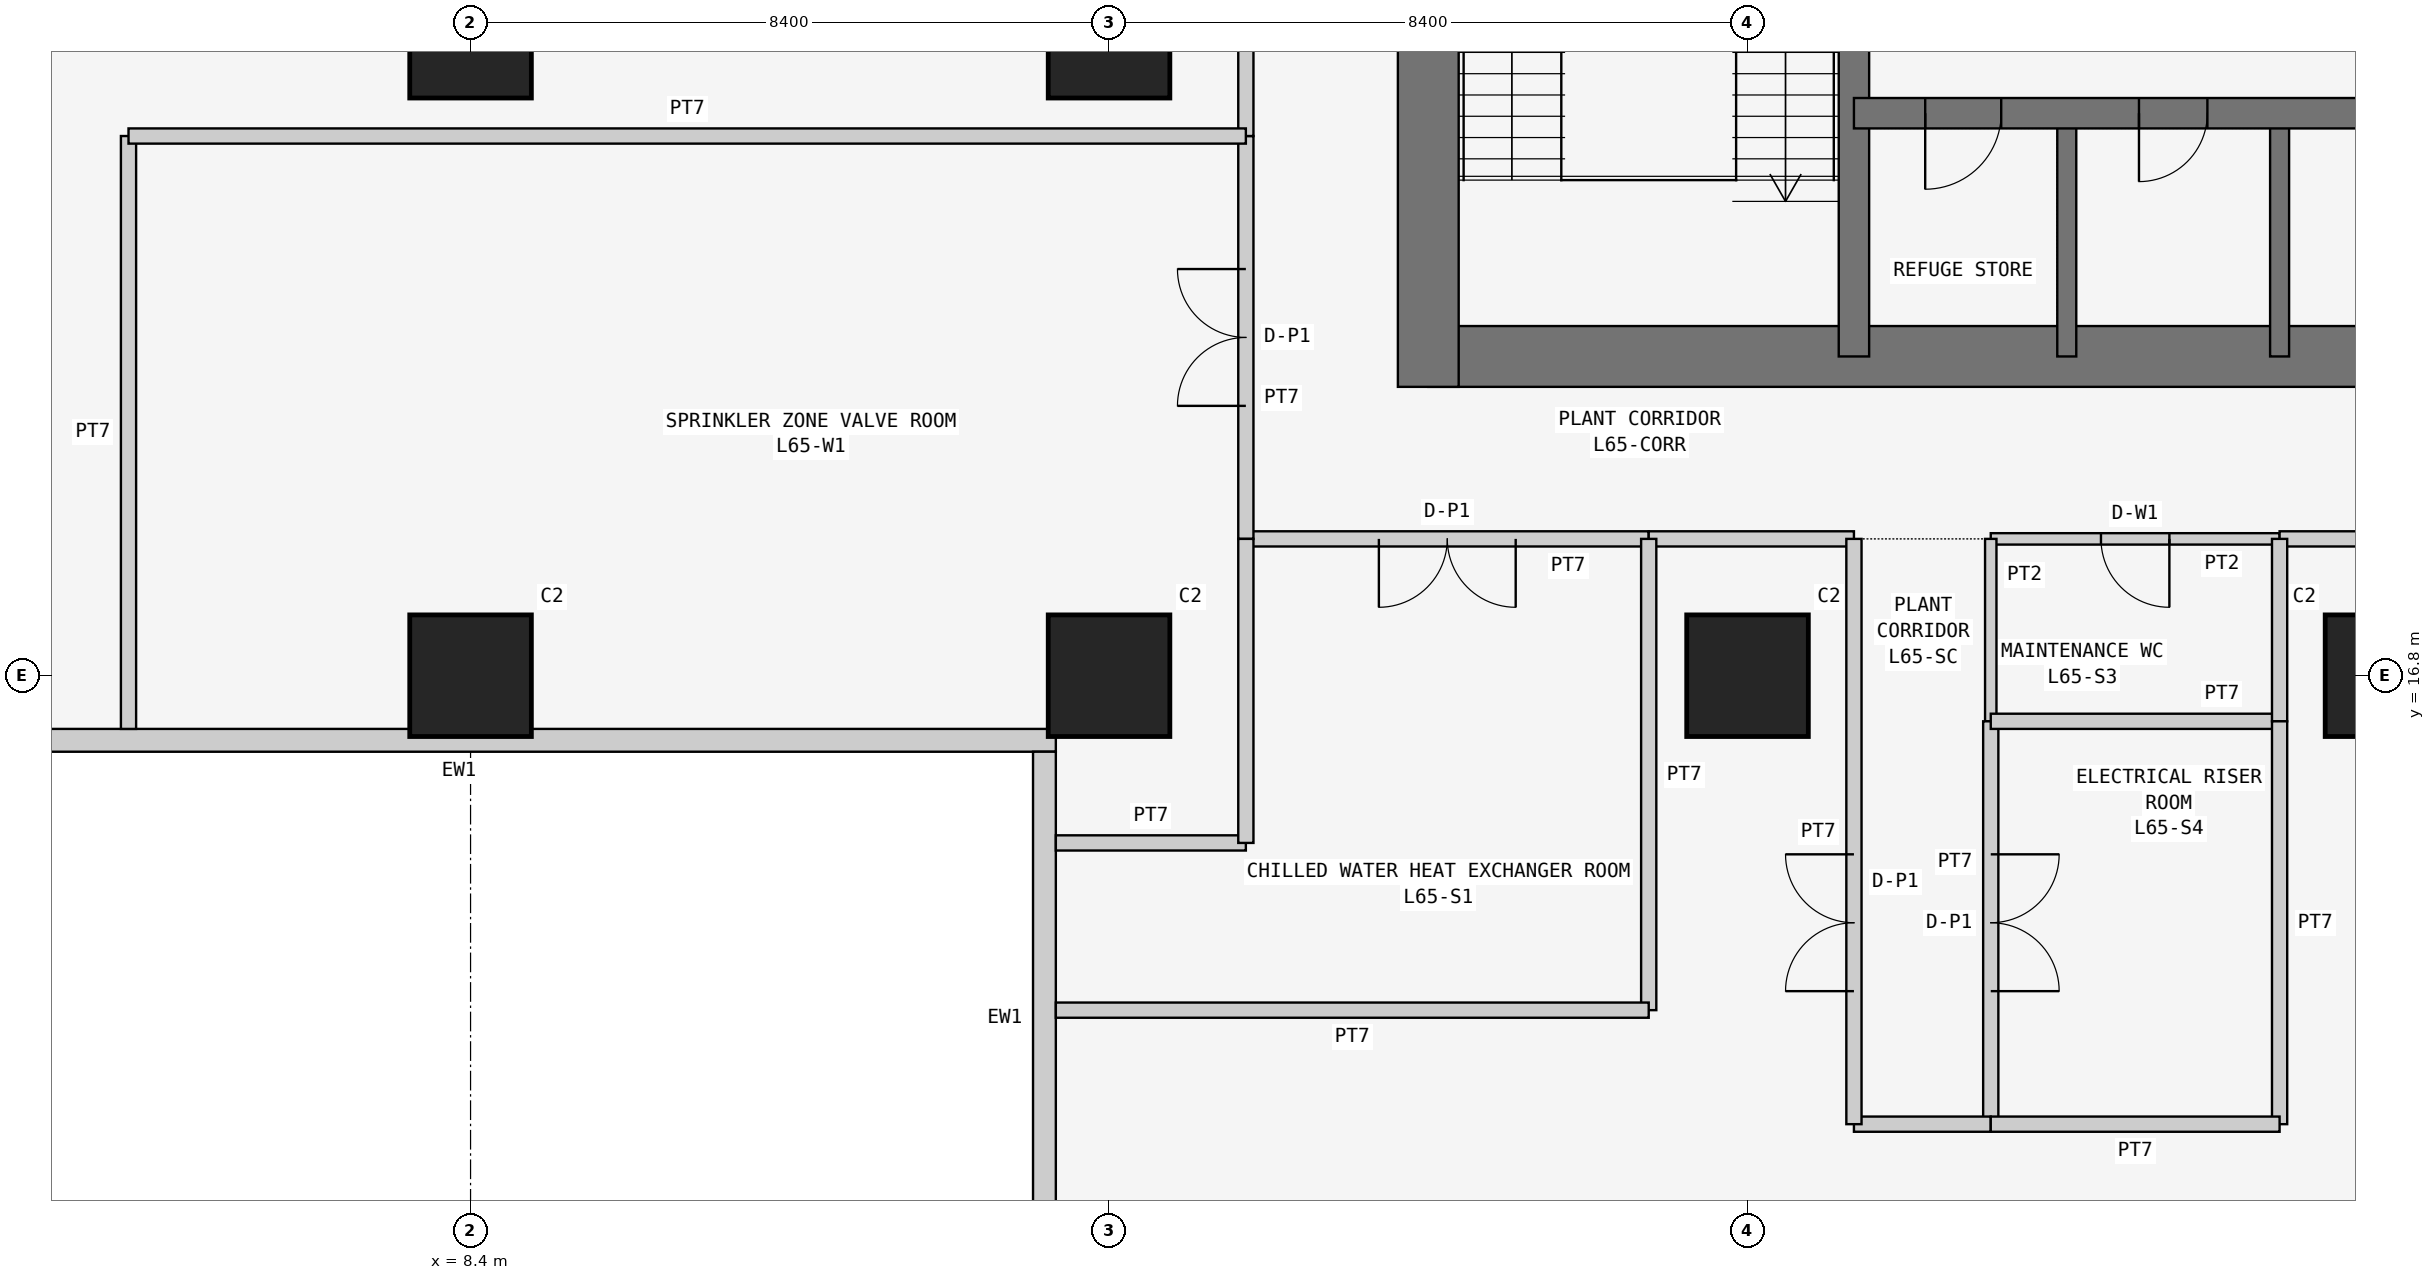
"""IFC4 building model, lengths in metres.
Left out: names, types, materials, properties, quantities, classifications, styles, units other than length and angle.
Written with IfcOpenShell. Run it as: python <this file> out.ifc"""

import sys

from ifc_helpers import new_model, si_unit, direction, frame, frame_2d, origin, origin_2d, place, context, subcontext, project, spatial, rectangle, extrude, element, fill, save


model = new_model("IFC4")
c1 = context("Model", 3, precision=1e-05, world=origin(), true_north=direction((0.0, 1.0)))
c2 = subcontext(c1, "Body", "Model", "MODEL_VIEW")
j1 = project(units=[si_unit("LENGTHUNIT", "METRE"), si_unit("PLANEANGLEUNIT", "RADIAN")], contexts=[c1])
p1 = place(None, origin())
s1 = spatial("IfcSite", under=j1, at=p1, CompositionType="ELEMENT")
p2 = place(p1, origin())
s2 = spatial("IfcBuilding", under=s1, at=p2, CompositionType="ELEMENT")
p3 = place(p2, frame((0.0, 0.0, 248.1)))
s3 = spatial("IfcBuildingStorey", under=s2, at=p3, CompositionType="ELEMENT", Elevation=248.1)
for number, where, z_axis, x_axis in (
    (1, (8.4, 16.8, 0.0), (0.0, 0.0, 1.0), (1.0, 0.0, 0.0)),
    (2, (8.4, 25.2, 0.0), (0.0, 0.0, 1.0), (1.0, 0.0, 0.0)),
    (3, (16.8, 16.8, 0.0), (0.0, 0.0, 1.0), (1.0, 0.0, 0.0)),
    (4, (16.8, 25.2, 0.0), (0.0, 0.0, 1.0), (1.0, 0.0, 0.0)),
    (5, (25.2, 16.8, 0.0), (0.0, 0.0, 1.0), (1.0, 0.0, 0.0)),
    (6, (33.6, 16.8, 0.0), (0.0, 0.0, 1.0), (1.0, 0.0, 0.0)),
):
    element("IfcColumn", number, at=place(p3, frame(where, z_axis=z_axis, x_axis=x_axis)), inside=s3, PredefinedType="COLUMN", context=c2, shape_type="SweptSolid", body=[
        extrude(rectangle(XDim=1.6, YDim=1.6, at=origin_2d()), origin(), (0.0, 0.0, 1.0), 6.0),
    ])
p4 = place(p3, frame((21.0, 21.0, 0.0), z_axis=(0.0, 0.0, 1.0), x_axis=(1.0, 0.0, 0.0)))
e7 = element("IfcWall", 7, at=p4, inside=s3, PredefinedType="SHEAR", context=c2, shape_type="SweptSolid", body=[
    extrude(rectangle(XDim=17.2, YDim=0.8, at=frame_2d((8.6, 0.0))), origin(), (0.0, 0.0, 1.0), 6.0),
])
p5 = place(p3, frame((21.0, 37.8, 0.0), z_axis=(0.0, 0.0, 1.0), x_axis=(0.0, -1.0, 0.0)))
e8 = element("IfcWall", 8, at=p5, inside=s3, PredefinedType="SHEAR", context=c2, shape_type="SweptSolid", body=[
    extrude(rectangle(XDim=17.2, YDim=0.8, at=frame_2d((8.6, 0.0))), origin(), (0.0, 0.0, 1.0), 6.0),
])
p6 = place(p5, frame((5.4, 0.0, 0.0)))
e9 = element("IfcOpeningElement", 9, at=p6, cuts=e8, PredefinedType="OPENING", context=c2, shape_type="SweptSolid", body=[
    extrude(rectangle(XDim=1.2, YDim=2.1, at=frame_2d((0.6, 1.05))), frame((0.0, 0.41, 0.0), z_axis=(0.0, -1.0, 0.0), x_axis=(1.0, 0.0, 0.0)), (0.0, 0.0, 1.0), 0.82),
])
p7 = place(p3, frame((26.6, 21.0, 0.0), z_axis=(0.0, 0.0, 1.0), x_axis=(0.0, 1.0, 0.0)))
e10 = element("IfcWall", 10, at=p7, inside=s3, PredefinedType="SHEAR", context=c2, shape_type="SweptSolid", body=[
    extrude(rectangle(XDim=16.8, YDim=0.4, at=frame_2d((8.4, 0.0))), origin(), (0.0, 0.0, 1.0), 6.0),
])
p8 = place(p7, frame((10.4, 0.0, 0.0)))
e11 = element("IfcOpeningElement", 11, at=p8, cuts=e10, PredefinedType="OPENING", context=c2, shape_type="SweptSolid", body=[
    extrude(rectangle(XDim=1.2, YDim=2.1, at=frame_2d((0.6, 1.05))), frame((0.0, 0.21, 0.0), z_axis=(0.0, -1.0, 0.0), x_axis=(1.0, 0.0, 0.0)), (0.0, 0.0, 1.0), 0.42),
])
p9 = place(p3, frame((26.6, 24.2, 0.0), z_axis=(0.0, 0.0, 1.0), x_axis=(1.0, 0.0, 0.0)))
e12 = element("IfcWall", 12, at=p9, inside=s3, PredefinedType="SHEAR", context=c2, shape_type="SweptSolid", body=[
    extrude(rectangle(XDim=11.2, YDim=0.4, at=frame_2d((5.6, 0.0))), origin(), (0.0, 0.0, 1.0), 6.0),
])
p10 = place(p9, frame((0.938, 0.0, 0.0)))
e13 = element("IfcOpeningElement", 13, at=p10, cuts=e12, PredefinedType="OPENING", context=c2, shape_type="SweptSolid", body=[
    extrude(rectangle(XDim=1.0, YDim=2.1, at=frame_2d((0.5, 1.05))), frame((0.0, 0.21, 0.0), z_axis=(0.0, -1.0, 0.0), x_axis=(1.0, 0.0, 0.0)), (0.0, 0.0, 1.0), 0.42),
])
p11 = place(p9, frame((3.75, 0.0, 0.0)))
e14 = element("IfcOpeningElement", 14, at=p11, cuts=e12, PredefinedType="OPENING", context=c2, shape_type="SweptSolid", body=[
    extrude(rectangle(XDim=0.9, YDim=2.1, at=frame_2d((0.45, 1.05))), frame((0.0, 0.21, 0.0), z_axis=(0.0, -1.0, 0.0), x_axis=(1.0, 0.0, 0.0)), (0.0, 0.0, 1.0), 0.42),
])
for number, where, z_axis, x_axis in (
    (15, (29.4, 21.0, 0.0), (0.0, 0.0, 1.0), (0.0, 1.0, 0.0)),
    (16, (32.2, 21.0, 0.0), (0.0, 0.0, 1.0), (0.0, 1.0, 0.0)),
):
    element("IfcWall", number, at=place(p3, frame(where, z_axis=z_axis, x_axis=x_axis)), inside=s3, PredefinedType="SHEAR", context=c2, shape_type="SweptSolid", body=[
        extrude(rectangle(XDim=3.2, YDim=0.25, at=frame_2d((1.6, 0.0))), origin(), (0.0, 0.0, 1.0), 6.0),
    ])
p12 = place(p3, frame((0.4, 15.95, 0.0), z_axis=(0.0, 0.0, 1.0), x_axis=(1.0, 0.0, 0.0)))
e17 = element("IfcWall", 17, at=p12, inside=s3, PredefinedType="SOLIDWALL", context=c2, shape_type="SweptSolid", body=[
    extrude(rectangle(XDim=15.7, YDim=0.3, at=frame_2d((7.85, 0.0))), origin(), (0.0, 0.0, 1.0), 5.85),
])
p13 = place(p3, frame((15.95, 15.8, 0.0), z_axis=(0.0, 0.0, 1.0), x_axis=(0.0, -1.0, 0.0)))
e18 = element("IfcWall", 18, at=p13, inside=s3, PredefinedType="SOLIDWALL", context=c2, shape_type="SweptSolid", body=[
    extrude(rectangle(XDim=7.0, YDim=0.3, at=frame_2d((3.5, 0.0))), origin(), (0.0, 0.0, 1.0), 5.85),
])
p14 = place(p3, frame((23.9, 18.6, 0.0), z_axis=(0.0, 0.0, 1.0), x_axis=(-1.0, 0.0, 0.0)))
e19 = element("IfcWall", 19, at=p14, inside=s3, PredefinedType="PARTITIONING", context=c2, shape_type="SweptSolid", body=[
    extrude(rectangle(XDim=5.3, YDim=0.2, at=frame_2d((2.65, 0.0))), origin(), (0.0, 0.0, 1.0), 5.85),
])
p15 = place(p14, frame((1.75, 0.0, 0.0)))
e20 = element("IfcOpeningElement", 20, at=p15, cuts=e19, PredefinedType="OPENING", context=c2, shape_type="SweptSolid", body=[
    extrude(rectangle(XDim=1.8, YDim=2.4, at=frame_2d((0.9, 1.2))), frame((0.0, 0.11, 0.0), z_axis=(0.0, -1.0, 0.0), x_axis=(1.0, 0.0, 0.0)), (0.0, 0.0, 1.0), 0.22),
])
p16 = place(p3, frame((32.2, 18.6, 0.0), z_axis=(0.0, 0.0, 1.0), x_axis=(-1.0, 0.0, 0.0)))
e21 = element("IfcWall", 21, at=p16, inside=s3, PredefinedType="PARTITIONING", context=c2, shape_type="SweptSolid", body=[
    extrude(rectangle(XDim=3.8, YDim=0.15, at=frame_2d((1.9, 0.0))), origin(), (0.0, 0.0, 1.0), 5.85),
])
p17 = place(p16, frame((1.45, 0.0, 0.0)))
e22 = element("IfcOpeningElement", 22, at=p17, cuts=e21, PredefinedType="OPENING", context=c2, shape_type="SweptSolid", body=[
    extrude(rectangle(XDim=0.9, YDim=2.1, at=frame_2d((0.45, 1.05))), frame((0.0, 0.085, 0.0), z_axis=(0.0, -1.0, 0.0), x_axis=(1.0, 0.0, 0.0)), (0.0, 0.0, 1.0), 0.17),
])
p18 = place(p3, frame((26.6, 18.6, 0.0), z_axis=(0.0, 0.0, 1.0), x_axis=(-1.0, 0.0, 0.0)))
e23 = element("IfcWall", 23, at=p18, inside=s3, PredefinedType="PARTITIONING", context=c2, shape_type="SweptSolid", body=[
    extrude(rectangle(XDim=2.7, YDim=0.2, at=frame_2d((1.35, 0.0))), origin(), (0.0, 0.0, 1.0), 5.85),
])
p19 = place(p3, frame((34.9, 18.6, 0.0), z_axis=(0.0, 0.0, 1.0), x_axis=(-1.0, 0.0, 0.0)))
e24 = element("IfcWall", 24, at=p19, inside=s3, PredefinedType="PARTITIONING", context=c2, shape_type="SweptSolid", body=[
    extrude(rectangle(XDim=2.7, YDim=0.2, at=frame_2d((1.35, 0.0))), origin(), (0.0, 0.0, 1.0), 5.85),
])
p20 = place(p3, frame((18.6, 18.6, 0.0), z_axis=(0.0, 0.0, 1.0), x_axis=(0.0, 1.0, 0.0)))
e25 = element("IfcWall", 25, at=p20, inside=s3, PredefinedType="PARTITIONING", context=c2, shape_type="SweptSolid", body=[
    extrude(rectangle(XDim=5.3, YDim=0.2, at=frame_2d((2.65, 0.0))), origin(), (0.0, 0.0, 1.0), 5.85),
])
p21 = place(p20, frame((1.75, 0.0, 0.0)))
e26 = element("IfcOpeningElement", 26, at=p21, cuts=e25, PredefinedType="OPENING", context=c2, shape_type="SweptSolid", body=[
    extrude(rectangle(XDim=1.8, YDim=2.4, at=frame_2d((0.9, 1.2))), frame((0.0, 0.11, 0.0), z_axis=(0.0, -1.0, 0.0), x_axis=(1.0, 0.0, 0.0)), (0.0, 0.0, 1.0), 0.22),
])
p22 = place(p3, frame((18.6, 23.9, 0.0), z_axis=(0.0, 0.0, 1.0), x_axis=(0.0, 1.0, 0.0)))
e27 = element("IfcWall", 27, at=p22, inside=s3, PredefinedType="PARTITIONING", context=c2, shape_type="SweptSolid", body=[
    extrude(rectangle(XDim=2.7, YDim=0.2, at=frame_2d((1.35, 0.0))), origin(), (0.0, 0.0, 1.0), 5.85),
])
p23 = place(p3, frame((23.9, 18.6, 0.0), z_axis=(0.0, 0.0, 1.0), x_axis=(0.0, -1.0, 0.0)))
e28 = element("IfcWall", 28, at=p23, inside=s3, PredefinedType="PARTITIONING", context=c2, shape_type="SweptSolid", body=[
    extrude(rectangle(XDim=6.2, YDim=0.2, at=frame_2d((3.1, 0.0))), origin(), (0.0, 0.0, 1.0), 5.85),
])
p24 = place(p3, frame((23.9, 12.4, 0.0), z_axis=(0.0, 0.0, 1.0), x_axis=(-1.0, 0.0, 0.0)))
e29 = element("IfcWall", 29, at=p24, inside=s3, PredefinedType="PARTITIONING", context=c2, shape_type="SweptSolid", body=[
    extrude(rectangle(XDim=7.8, YDim=0.2, at=frame_2d((3.9, 0.0))), origin(), (0.0, 0.0, 1.0), 5.85),
])
p25 = place(p3, frame((16.1, 14.6, 0.0), z_axis=(0.0, 0.0, 1.0), x_axis=(1.0, 0.0, 0.0)))
e30 = element("IfcWall", 30, at=p25, inside=s3, PredefinedType="PARTITIONING", context=c2, shape_type="SweptSolid", body=[
    extrude(rectangle(XDim=2.5, YDim=0.2, at=frame_2d((1.25, 0.0))), origin(), (0.0, 0.0, 1.0), 5.85),
])
p26 = place(p3, frame((18.6, 14.6, 0.0), z_axis=(0.0, 0.0, 1.0), x_axis=(0.0, 1.0, 0.0)))
e31 = element("IfcWall", 31, at=p26, inside=s3, PredefinedType="PARTITIONING", context=c2, shape_type="SweptSolid", body=[
    extrude(rectangle(XDim=4.0, YDim=0.2, at=frame_2d((2.0, 0.0))), origin(), (0.0, 0.0, 1.0), 5.85),
])
p27 = place(p3, frame((28.4, 18.6, 0.0), z_axis=(0.0, 0.0, 1.0), x_axis=(0.0, -1.0, 0.0)))
e32 = element("IfcWall", 32, at=p27, inside=s3, PredefinedType="PARTITIONING", context=c2, shape_type="SweptSolid", body=[
    extrude(rectangle(XDim=2.4, YDim=0.15, at=frame_2d((1.2, 0.0))), origin(), (0.0, 0.0, 1.0), 5.85),
])
p28 = place(p3, frame((28.4, 16.2, 0.0), z_axis=(0.0, 0.0, 1.0), x_axis=(0.0, -1.0, 0.0)))
e33 = element("IfcWall", 33, at=p28, inside=s3, PredefinedType="PARTITIONING", context=c2, shape_type="SweptSolid", body=[
    extrude(rectangle(XDim=5.3, YDim=0.2, at=frame_2d((2.65, 0.0))), origin(), (0.0, 0.0, 1.0), 5.85),
])
p29 = place(p28, frame((1.75, 0.0, 0.0)))
e34 = element("IfcOpeningElement", 34, at=p29, cuts=e33, PredefinedType="OPENING", context=c2, shape_type="SweptSolid", body=[
    extrude(rectangle(XDim=1.8, YDim=2.4, at=frame_2d((0.9, 1.2))), frame((0.0, 0.11, 0.0), z_axis=(0.0, -1.0, 0.0), x_axis=(1.0, 0.0, 0.0)), (0.0, 0.0, 1.0), 0.22),
])
p30 = place(p3, frame((28.4, 10.9, 0.0), z_axis=(0.0, 0.0, 1.0), x_axis=(-1.0, 0.0, 0.0)))
e35 = element("IfcWall", 35, at=p30, inside=s3, PredefinedType="PARTITIONING", context=c2, shape_type="SweptSolid", body=[
    extrude(rectangle(XDim=1.8, YDim=0.2, at=frame_2d((0.9, 0.0))), origin(), (0.0, 0.0, 1.0), 5.85),
])
p31 = place(p3, frame((26.6, 10.9, 0.0), z_axis=(0.0, 0.0, 1.0), x_axis=(0.0, 1.0, 0.0)))
e36 = element("IfcWall", 36, at=p31, inside=s3, PredefinedType="PARTITIONING", context=c2, shape_type="SweptSolid", body=[
    extrude(rectangle(XDim=7.7, YDim=0.2, at=frame_2d((3.85, 0.0))), origin(), (0.0, 0.0, 1.0), 5.85),
])
p32 = place(p31, frame((1.75, 0.0, 0.0)))
e37 = element("IfcOpeningElement", 37, at=p32, cuts=e36, PredefinedType="OPENING", context=c2, shape_type="SweptSolid", body=[
    extrude(rectangle(XDim=1.8, YDim=2.4, at=frame_2d((0.9, 1.2))), frame((0.0, 0.11, 0.0), z_axis=(0.0, -1.0, 0.0), x_axis=(1.0, 0.0, 0.0)), (0.0, 0.0, 1.0), 0.22),
])
p33 = place(p3, frame((32.2, 16.2, 0.0), z_axis=(0.0, 0.0, 1.0), x_axis=(-1.0, 0.0, 0.0)))
e38 = element("IfcWall", 38, at=p33, inside=s3, PredefinedType="PARTITIONING", context=c2, shape_type="SweptSolid", body=[
    extrude(rectangle(XDim=3.8, YDim=0.2, at=frame_2d((1.9, 0.0))), origin(), (0.0, 0.0, 1.0), 5.85),
])
p34 = place(p3, frame((32.2, 18.6, 0.0), z_axis=(0.0, 0.0, 1.0), x_axis=(0.0, -1.0, 0.0)))
e39 = element("IfcWall", 39, at=p34, inside=s3, PredefinedType="PARTITIONING", context=c2, shape_type="SweptSolid", body=[
    extrude(rectangle(XDim=2.4, YDim=0.2, at=frame_2d((1.2, 0.0))), origin(), (0.0, 0.0, 1.0), 5.85),
])
p35 = place(p3, frame((32.2, 16.2, 0.0), z_axis=(0.0, 0.0, 1.0), x_axis=(0.0, -1.0, 0.0)))
e40 = element("IfcWall", 40, at=p35, inside=s3, PredefinedType="PARTITIONING", context=c2, shape_type="SweptSolid", body=[
    extrude(rectangle(XDim=5.3, YDim=0.2, at=frame_2d((2.65, 0.0))), origin(), (0.0, 0.0, 1.0), 5.85),
])
p36 = place(p3, frame((32.2, 10.9, 0.0), z_axis=(0.0, 0.0, 1.0), x_axis=(-1.0, 0.0, 0.0)))
e41 = element("IfcWall", 41, at=p36, inside=s3, PredefinedType="PARTITIONING", context=c2, shape_type="SweptSolid", body=[
    extrude(rectangle(XDim=3.8, YDim=0.2, at=frame_2d((1.9, 0.0))), origin(), (0.0, 0.0, 1.0), 5.85),
])
p37 = place(p3, frame((3.9, 16.1, 0.0), z_axis=(0.0, 0.0, 1.0), x_axis=(0.0, 1.0, 0.0)))
e42 = element("IfcWall", 42, at=p37, inside=s3, PredefinedType="PARTITIONING", context=c2, shape_type="SweptSolid", body=[
    extrude(rectangle(XDim=7.8, YDim=0.2, at=frame_2d((3.9, 0.0))), origin(), (0.0, 0.0, 1.0), 5.75),
])
p38 = place(p3, frame((3.9, 23.9, 0.0), z_axis=(0.0, 0.0, 1.0), x_axis=(1.0, 0.0, 0.0)))
e43 = element("IfcWall", 43, at=p38, inside=s3, PredefinedType="PARTITIONING", context=c2, shape_type="SweptSolid", body=[
    extrude(rectangle(XDim=14.7, YDim=0.2, at=frame_2d((7.35, 0.0))), origin(), (0.0, 0.0, 1.0), 5.75),
])
p39 = place(p15, origin())
e44 = element("IfcDoor", 44, at=p39, inside=s3, OperationType="DOUBLE_DOOR_SINGLE_SWING", PredefinedType="DOOR", context=c2, shape_type="SweptSolid", body=[
    extrude(rectangle(XDim=1.8, YDim=2.4, at=frame_2d((0.9, 1.2))), frame((0.0, 0.025, 0.0), z_axis=(0.0, -1.0, 0.0), x_axis=(1.0, 0.0, 0.0)), (0.0, 0.0, 1.0), 0.05),
])
fill(e20, e44)
p40 = place(p17, origin())
e45 = element("IfcDoor", 45, at=p40, inside=s3, OperationType="SINGLE_SWING_LEFT", PredefinedType="DOOR", context=c2, shape_type="SweptSolid", body=[
    extrude(rectangle(XDim=0.9, YDim=2.1, at=frame_2d((0.45, 1.05))), frame((0.0, 0.025, 0.0), z_axis=(0.0, -1.0, 0.0), x_axis=(1.0, 0.0, 0.0)), (0.0, 0.0, 1.0), 0.05),
])
fill(e22, e45)
p41 = place(p29, origin())
e46 = element("IfcDoor", 46, at=p41, inside=s3, OperationType="DOUBLE_DOOR_SINGLE_SWING", PredefinedType="DOOR", context=c2, shape_type="SweptSolid", body=[
    extrude(rectangle(XDim=1.8, YDim=2.4, at=frame_2d((0.9, 1.2))), frame((0.0, 0.025, 0.0), z_axis=(0.0, -1.0, 0.0), x_axis=(1.0, 0.0, 0.0)), (0.0, 0.0, 1.0), 0.05),
])
fill(e34, e46)
p42 = place(p32, origin())
e47 = element("IfcDoor", 47, at=p42, inside=s3, OperationType="DOUBLE_DOOR_SINGLE_SWING", PredefinedType="DOOR", context=c2, shape_type="SweptSolid", body=[
    extrude(rectangle(XDim=1.8, YDim=2.4, at=frame_2d((0.9, 1.2))), frame((0.0, 0.025, 0.0), z_axis=(0.0, -1.0, 0.0), x_axis=(1.0, 0.0, 0.0)), (0.0, 0.0, 1.0), 0.05),
])
fill(e37, e47)
p43 = place(p21, origin())
e48 = element("IfcDoor", 48, at=p43, inside=s3, OperationType="DOUBLE_DOOR_SINGLE_SWING", PredefinedType="DOOR", context=c2, shape_type="SweptSolid", body=[
    extrude(rectangle(XDim=1.8, YDim=2.4, at=frame_2d((0.9, 1.2))), frame((0.0, 0.025, 0.0), z_axis=(0.0, -1.0, 0.0), x_axis=(1.0, 0.0, 0.0)), (0.0, 0.0, 1.0), 0.05),
])
fill(e26, e48)
p44 = place(p10, frame((1.0, 0.0, 0.0), z_axis=(0.0, 0.0, 1.0), x_axis=(-1.0, 0.0, 0.0)))
e49 = element("IfcDoor", 49, at=p44, inside=s3, OperationType="SINGLE_SWING_RIGHT", PredefinedType="DOOR", context=c2, shape_type="SweptSolid", body=[
    extrude(rectangle(XDim=1.0, YDim=2.1, at=frame_2d((0.5, 1.05))), frame((0.0, 0.025, 0.0), z_axis=(0.0, -1.0, 0.0), x_axis=(1.0, 0.0, 0.0)), (0.0, 0.0, 1.0), 0.05),
])
fill(e13, e49)
p45 = place(p11, frame((0.9, 0.0, 0.0), z_axis=(0.0, 0.0, 1.0), x_axis=(-1.0, 0.0, 0.0)))
e50 = element("IfcDoor", 50, at=p45, inside=s3, OperationType="SINGLE_SWING_RIGHT", PredefinedType="DOOR", context=c2, shape_type="SweptSolid", body=[
    extrude(rectangle(XDim=0.9, YDim=2.1, at=frame_2d((0.45, 1.05))), frame((0.0, 0.025, 0.0), z_axis=(0.0, -1.0, 0.0), x_axis=(1.0, 0.0, 0.0)), (0.0, 0.0, 1.0), 0.05),
])
fill(e14, e50)
save(model, sys.argv[1])
